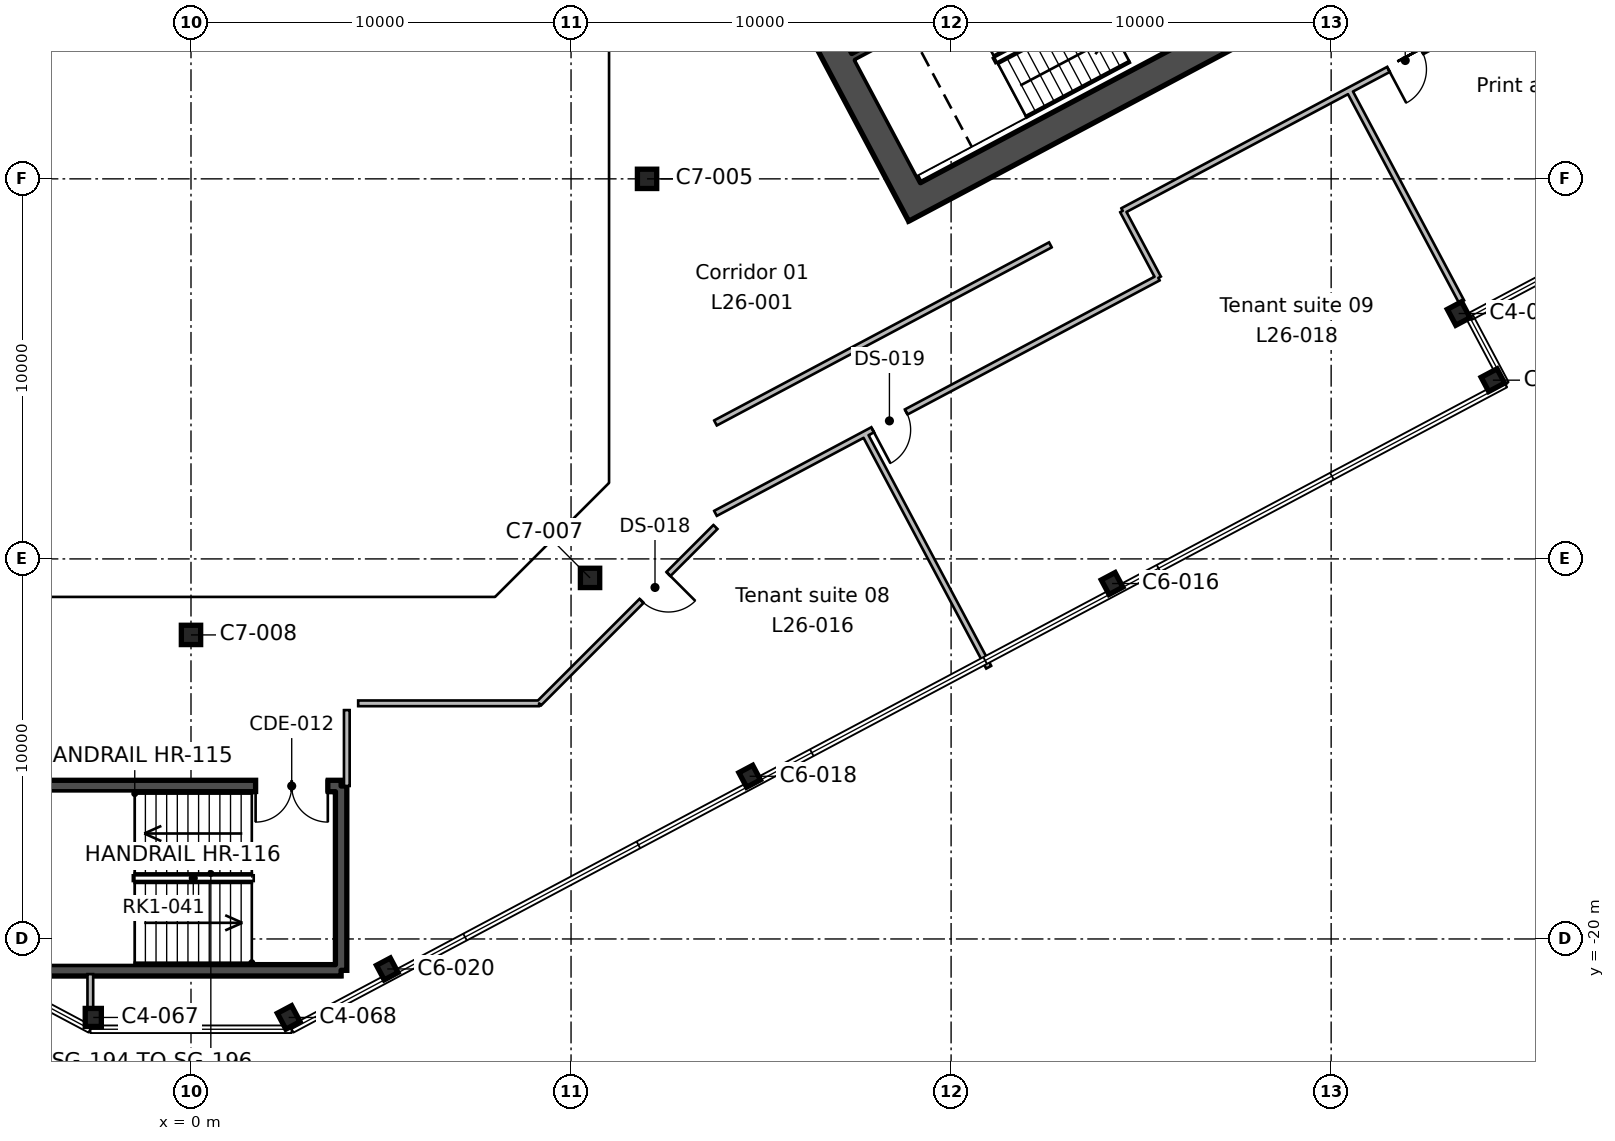
"""IFC4 building model, lengths in metres.
Left out: names, types, materials, properties, quantities, classifications, styles, units other than length and angle.
Written with IfcOpenShell. Run it as: python <this file> out.ifc"""

import sys

from ifc_helpers import new_model, si_unit, direction, frame, frame_2d, origin, origin_2d, place, context, subcontext, project, spatial, rectangle, hollow_rectangle, i_section, extrude, element, fill, save


model = new_model("IFC4")
c1 = context("Model", 3, precision=1e-05, world=origin(), true_north=direction((0.0, 1.0)))
c2 = subcontext(c1, "Body", "Model", "MODEL_VIEW")
j1 = project(units=[si_unit("LENGTHUNIT", "METRE"), si_unit("PLANEANGLEUNIT", "RADIAN")], contexts=[c1])
p1 = place(None, origin())
s1 = spatial("IfcSite", under=j1, at=p1, CompositionType="ELEMENT")
p2 = place(p1, origin())
s2 = spatial("IfcBuilding", under=s1, at=p2, CompositionType="ELEMENT")
p3 = place(p2, frame((0.0, 0.0, 130.2)))
s3 = spatial("IfcBuildingStorey", under=s2, at=p3, CompositionType="ELEMENT", Elevation=130.2)
for number, where, z_axis, x_axis in (
    (1, (-2.571, -22.065, 0.0), (0.0, 0.0, 1.0), (1.0, 0.0, 0.0)),
    (2, (2.571, -22.065, 0.0), (0.0, 0.0, 1.0), (0.883, 0.469, 0.0)),
):
    element("IfcColumn", number, at=place(p3, frame(where, z_axis=z_axis, x_axis=x_axis)), inside=s3, PredefinedType="COLUMN", context=c2, shape_type="SweptSolid", body=[
        extrude(i_section(OverallWidth=0.424, OverallDepth=0.475, WebThickness=0.048, FlangeThickness=0.077, FilletRadius=0.015, at=origin_2d()), origin(), (0.0, 0.0, 1.0), 4.0),
    ])
for number, where, z_axis, x_axis in (
    (3, (5.164, -20.789, 0.0), (0.0, 0.0, 1.0), (0.883, 0.469, 0.0)),
    (4, (14.7, -15.719, 0.0), (0.0, 0.0, 1.0), (0.883, 0.469, 0.0)),
):
    element("IfcColumn", number, at=place(p3, frame(where, z_axis=z_axis, x_axis=x_axis)), inside=s3, PredefinedType="COLUMN", context=c2, shape_type="SweptSolid", body=[
        extrude(i_section(OverallWidth=0.412, OverallDepth=0.434, WebThickness=0.036, FlangeThickness=0.057, FilletRadius=0.015, at=origin_2d()), origin(), (0.0, 0.0, 1.0), 4.0),
    ])
p4 = place(p3, frame((0.0, -12.0, 0.0), z_axis=(0.0, 0.0, 1.0), x_axis=(1.0, 0.0, 0.0)))
e5 = element("IfcColumn", 5, at=p4, inside=s3, PredefinedType="COLUMN", context=c2, shape_type="SweptSolid", body=[
    extrude(hollow_rectangle(XDim=0.508, YDim=0.508, WallThickness=0.012, InnerFilletRadius=0.006, OuterFilletRadius=0.018, at=origin_2d()), origin(), (0.0, 0.0, 1.0), 4.0),
])
p5 = place(p3, frame((24.236, -10.648, 0.0), z_axis=(0.0, 0.0, 1.0), x_axis=(0.882947592859, 0.469471562786, 0.0)))
e6 = element("IfcColumn", 6, at=p5, inside=s3, PredefinedType="COLUMN", context=c2, shape_type="SweptSolid", body=[
    extrude(i_section(OverallWidth=0.412, OverallDepth=0.434, WebThickness=0.036, FlangeThickness=0.057, FilletRadius=0.015, at=origin_2d()), origin(), (0.0, 0.0, 1.0), 4.0),
])
p6 = place(p3, frame((10.5, -10.5, 0.0), z_axis=(0.0, 0.0, 1.0), x_axis=(1.0, 0.0, 0.0)))
e7 = element("IfcColumn", 7, at=p6, inside=s3, PredefinedType="COLUMN", context=c2, shape_type="SweptSolid", body=[
    extrude(hollow_rectangle(XDim=0.508, YDim=0.508, WallThickness=0.012, InnerFilletRadius=0.006, OuterFilletRadius=0.018, at=origin_2d()), origin(), (0.0, 0.0, 1.0), 4.0),
])
for number, where, z_axis, x_axis in (
    (8, (34.256, -5.297, 0.0), (0.0, 0.0, 1.0), (-0.469, 0.883, 0.0)),
    (9, (33.356, -3.543, 0.0), (0.0, 0.0, 1.0), (0.883, 0.469, 0.0)),
):
    element("IfcColumn", number, at=place(p3, frame(where, z_axis=z_axis, x_axis=x_axis)), inside=s3, PredefinedType="COLUMN", context=c2, shape_type="SweptSolid", body=[
        extrude(i_section(OverallWidth=0.424, OverallDepth=0.475, WebThickness=0.048, FlangeThickness=0.077, FilletRadius=0.015, at=origin_2d()), origin(), (0.0, 0.0, 1.0), 4.0),
    ])
p7 = place(p3, frame((12.0, 0.0, 0.0), z_axis=(0.0, 0.0, 1.0), x_axis=(1.0, 0.0, 0.0)))
e10 = element("IfcColumn", 10, at=p7, inside=s3, PredefinedType="COLUMN", context=c2, shape_type="SweptSolid", body=[
    extrude(hollow_rectangle(XDim=0.508, YDim=0.508, WallThickness=0.012, InnerFilletRadius=0.006, OuterFilletRadius=0.018, at=origin_2d()), origin(), (0.0, 0.0, 1.0), 4.0),
])
p8 = place(p3, frame((19.215, -0.939, 0.0), z_axis=(0.0, 0.0, 1.0), x_axis=(-0.469479580143, 0.882943329908, 0.0)))
e11 = element("IfcWall", 11, at=p8, inside=s3, PredefinedType="SHEAR", context=c2, shape_type="SweptSolid", body=[
    extrude(rectangle(XDim=19.7, YDim=0.75, at=frame_2d((9.85, 0.0))), origin(), (0.0, 0.0, 1.0), 4.0),
])
p9 = place(p8, frame((6.85, 0.0, 0.0)))
e12 = element("IfcOpeningElement", 12, at=p9, cuts=e11, PredefinedType="OPENING", context=c2, shape_type="SweptSolid", body=[
    extrude(rectangle(XDim=2.4, YDim=2.4, at=frame_2d((1.2, 1.2))), frame((0.0, 0.385, 0.0), z_axis=(0.0, -1.0, 0.0), x_axis=(1.0, 0.0, 0.0)), (0.0, 0.0, 1.0), 0.77),
])
p10 = place(p3, frame((19.37, -0.432, 0.0), z_axis=(0.0, 0.0, 1.0), x_axis=(0.88294509198, 0.469476266226, 0.0)))
e13 = element("IfcWall", 13, at=p10, inside=s3, PredefinedType="SHEAR", context=c2, shape_type="SweptSolid", body=[
    extrude(rectangle(XDim=20.2, YDim=0.75, at=frame_2d((10.1, 0.0))), origin(), (0.0, 0.0, 1.0), 4.0),
])
p11 = place(p3, frame((17.434, 3.21, 0.0), z_axis=(0.0, 0.0, 1.0), x_axis=(0.882940221191, 0.469485426614, 0.0)))
e14 = element("IfcWall", 14, at=p11, inside=s3, PredefinedType="SHEAR", context=c2, shape_type="SweptSolid", body=[
    extrude(rectangle(XDim=8.0, YDim=0.2, at=frame_2d((4.0, 0.0))), origin(), (0.0, 0.0, 1.0), 4.0),
])
p12 = place(p3, frame((3.95, -15.975, 0.0), z_axis=(0.0, 0.0, 1.0), x_axis=(0.0, -1.0, 0.0)))
e15 = element("IfcWall", 15, at=p12, inside=s3, PredefinedType="SHEAR", context=c2, shape_type="SweptSolid", body=[
    extrude(rectangle(XDim=4.85, YDim=0.3, at=frame_2d((2.425, 0.0))), origin(), (0.0, 0.0, 1.0), 4.0),
])
p13 = place(p3, frame((3.95, -20.825, 0.0), z_axis=(0.0, 0.0, 1.0), x_axis=(-1.0, 0.0, 0.0)))
e16 = element("IfcWall", 16, at=p13, inside=s3, PredefinedType="SHEAR", context=c2, shape_type="SweptSolid", body=[
    extrude(rectangle(XDim=8.3, YDim=0.3, at=frame_2d((4.15, 0.0))), origin(), (0.0, 0.0, 1.0), 4.0),
])
p14 = place(p3, frame((-4.35, -15.975, 0.0), z_axis=(0.0, 0.0, 1.0), x_axis=(1.0, 0.0, 0.0)))
e17 = element("IfcWall", 17, at=p14, inside=s3, PredefinedType="SHEAR", context=c2, shape_type="SweptSolid", body=[
    extrude(rectangle(XDim=8.3, YDim=0.3, at=frame_2d((4.15, 0.0))), origin(), (0.0, 0.0, 1.0), 4.0),
])
p15 = place(p14, frame((6.05, 0.0, 0.0)))
e18 = element("IfcOpeningElement", 18, at=p15, cuts=e17, PredefinedType="OPENING", context=c2, shape_type="SweptSolid", body=[
    extrude(rectangle(XDim=1.9, YDim=2.1, at=frame_2d((0.95, 1.05))), frame((0.0, 0.16, 0.0), z_axis=(0.0, -1.0, 0.0), x_axis=(1.0, 0.0, 0.0)), (0.0, 0.0, 1.0), 0.32),
])
p16 = place(p3, frame((-2.649, -20.925, 0.0), z_axis=(0.0, 0.0, 1.0), x_axis=(0.0, -1.0, 0.0)))
e19 = element("IfcWall", 19, at=p16, inside=s3, PredefinedType="PARTITIONING", context=c2, shape_type="SweptSolid", body=[
    extrude(rectangle(XDim=0.903, YDim=0.15, at=frame_2d((0.451, 0.0))), origin(), (0.0, 0.0, 1.0), 3.64),
])
p17 = place(p3, frame((4.1, -15.975, 0.0), z_axis=(0.0, 0.0, 1.0), x_axis=(0.0, 1.0, 0.0)))
e20 = element("IfcWall", 20, at=p17, inside=s3, PredefinedType="PARTITIONING", context=c2, shape_type="SweptSolid", body=[
    extrude(rectangle(XDim=1.997, YDim=0.15, at=frame_2d((0.999, 0.0))), origin(), (0.0, 0.0, 1.0), 3.64),
])
p18 = place(p3, frame((13.8, -9.16, 0.0), z_axis=(0.0, 0.0, 1.0), x_axis=(-0.707106781187, -0.707106781187, 0.0)))
e21 = element("IfcWall", 21, at=p18, inside=s3, PredefinedType="PARTITIONING", context=c2, shape_type="SweptSolid", body=[
    extrude(rectangle(XDim=6.562, YDim=0.15, at=frame_2d((3.281, 0.0))), origin(), (0.0, 0.0, 1.0), 3.64),
])
p19 = place(p18, frame((1.75, 0.0, 0.0)))
e22 = element("IfcOpeningElement", 22, at=p19, cuts=e21, PredefinedType="OPENING", context=c2, shape_type="SweptSolid", body=[
    extrude(rectangle(XDim=1.0, YDim=2.1, at=frame_2d((0.5, 1.05))), frame((0.0, 0.085, 0.0), z_axis=(0.0, -1.0, 0.0), x_axis=(1.0, 0.0, 0.0)), (0.0, 0.0, 1.0), 0.17),
])
p20 = place(p3, frame((9.16, -13.8, 0.0), z_axis=(0.0, 0.0, 1.0), x_axis=(-1.0, 0.0, 0.0)))
e23 = element("IfcWall", 23, at=p20, inside=s3, PredefinedType="PARTITIONING", context=c2, shape_type="SweptSolid", body=[
    extrude(rectangle(XDim=4.761, YDim=0.15, at=frame_2d((2.38, 0.0))), origin(), (0.0, 0.0, 1.0), 3.64),
])
p21 = place(p3, frame((17.727, -6.713, 0.0), z_axis=(0.0, 0.0, 1.0), x_axis=(0.469441120945, -0.8829637784, 0.0)))
e24 = element("IfcWall", 24, at=p21, inside=s3, PredefinedType="PARTITIONING", context=c2, shape_type="SweptSolid", body=[
    extrude(rectangle(XDim=6.951, YDim=0.15, at=frame_2d((3.475, 0.0))), origin(), (0.0, 0.0, 1.0), 3.64),
])
p22 = place(p3, frame((19.216, -5.922, 0.0), z_axis=(0.0, 0.0, 1.0), x_axis=(-0.882938387259, -0.469488875591, 0.0)))
e25 = element("IfcWall", 25, at=p22, inside=s3, PredefinedType="PARTITIONING", context=c2, shape_type="SweptSolid", body=[
    extrude(rectangle(XDim=6.134, YDim=0.15, at=frame_2d((3.067, 0.0))), origin(), (0.0, 0.0, 1.0), 3.64),
])
p23 = place(p22, frame((0.45, 0.0, 0.0)))
e26 = element("IfcOpeningElement", 26, at=p23, cuts=e25, PredefinedType="OPENING", context=c2, shape_type="SweptSolid", body=[
    extrude(rectangle(XDim=1.0, YDim=2.1, at=frame_2d((0.5, 1.05))), frame((0.0, 0.085, 0.0), z_axis=(0.0, -1.0, 0.0), x_axis=(1.0, 0.0, 0.0)), (0.0, 0.0, 1.0), 0.17),
])
p24 = place(p3, frame((24.515, -0.842, 0.0), z_axis=(0.0, 0.0, 1.0), x_axis=(0.469509609091, -0.882927362228, 0.0)))
e27 = element("IfcWall", 27, at=p24, inside=s3, PredefinedType="PARTITIONING", context=c2, shape_type="SweptSolid", body=[
    extrude(rectangle(XDim=1.998, YDim=0.15, at=frame_2d((0.999, 0.0))), origin(), (0.0, 0.0, 1.0), 3.64),
])
p25 = place(p3, frame((25.453, -2.606, 0.0), z_axis=(0.0, 0.0, 1.0), x_axis=(-0.882948296906, -0.469470238663, 0.0)))
e28 = element("IfcWall", 28, at=p25, inside=s3, PredefinedType="PARTITIONING", context=c2, shape_type="SweptSolid", body=[
    extrude(rectangle(XDim=7.064, YDim=0.15, at=frame_2d((3.532, 0.0))), origin(), (0.0, 0.0, 1.0), 3.64),
])
p26 = place(p3, frame((30.474, 2.329, 0.0), z_axis=(0.0, 0.0, 1.0), x_axis=(0.469455518244, -0.882956123706, 0.0)))
e29 = element("IfcWall", 29, at=p26, inside=s3, PredefinedType="PARTITIONING", context=c2, shape_type="SweptSolid", body=[
    extrude(rectangle(XDim=6.3, YDim=0.15, at=frame_2d((3.15, 0.0))), origin(), (0.0, 0.0, 1.0), 3.64),
])
p27 = place(p3, frame((39.321, 7.034, 0.0), z_axis=(0.0, 0.0, 1.0), x_axis=(-0.88292452231, -0.469514949605, 0.0)))
e30 = element("IfcWall", 30, at=p27, inside=s3, PredefinedType="PARTITIONING", context=c2, shape_type="SweptSolid", body=[
    extrude(rectangle(XDim=16.771, YDim=0.15, at=frame_2d((8.385, 0.0))), origin(), (0.0, 0.0, 1.0), 3.64),
])
p28 = place(p27, frame((7.849, 0.0, 0.0)))
e31 = element("IfcOpeningElement", 31, at=p28, cuts=e30, PredefinedType="OPENING", context=c2, shape_type="SweptSolid", body=[
    extrude(rectangle(XDim=1.0, YDim=2.1, at=frame_2d((0.5, 1.05))), frame((0.0, 0.085, 0.0), z_axis=(0.0, -1.0, 0.0), x_axis=(1.0, 0.0, 0.0)), (0.0, 0.0, 1.0), 0.17),
])
p29 = place(p3, frame((13.8, -6.423, 0.0), z_axis=(0.0, 0.0, 1.0), x_axis=(0.882944014424, 0.469478292782, 0.0)))
e32 = element("IfcWall", 32, at=p29, inside=s3, PredefinedType="PARTITIONING", context=c2, shape_type="SweptSolid", body=[
    extrude(rectangle(XDim=9.981, YDim=0.15, at=frame_2d((4.991, 0.0))), origin(), (0.0, 0.0, 1.0), 3.64),
])
p30 = place(p15, frame((1.9, 0.0, 0.0), z_axis=(0.0, 0.0, 1.0), x_axis=(-1.0, 0.0, 0.0)))
e33 = element("IfcDoor", 33, at=p30, inside=s3, OperationType="DOUBLE_DOOR_SINGLE_SWING", PredefinedType="DOOR", context=c2, shape_type="SweptSolid", body=[
    extrude(rectangle(XDim=1.9, YDim=2.1, at=frame_2d((0.95, 1.05))), frame((0.0, 0.025, 0.0), z_axis=(0.0, -1.0, 0.0), x_axis=(1.0, 0.0, 0.0)), (0.0, 0.0, 1.0), 0.05),
])
fill(e18, e33)
p31 = place(p19, origin())
e34 = element("IfcDoor", 34, at=p31, inside=s3, OperationType="SINGLE_SWING_LEFT", PredefinedType="DOOR", context=c2, shape_type="SweptSolid", body=[
    extrude(rectangle(XDim=1.0, YDim=2.1, at=frame_2d((0.5, 1.05))), frame((0.0, 0.025, 0.0), z_axis=(0.0, -1.0, 0.0), x_axis=(1.0, 0.0, 0.0)), (0.0, 0.0, 1.0), 0.05),
])
fill(e22, e34)
p32 = place(p23, origin())
e35 = element("IfcDoor", 35, at=p32, inside=s3, OperationType="SINGLE_SWING_RIGHT", PredefinedType="DOOR", context=c2, shape_type="SweptSolid", body=[
    extrude(rectangle(XDim=1.0, YDim=2.1, at=frame_2d((0.5, 1.05))), frame((0.0, 0.025, 0.0), z_axis=(0.0, -1.0, 0.0), x_axis=(1.0, 0.0, 0.0)), (0.0, 0.0, 1.0), 0.05),
])
fill(e26, e35)
p33 = place(p28, origin())
e36 = element("IfcDoor", 36, at=p33, inside=s3, OperationType="SINGLE_SWING_RIGHT", PredefinedType="DOOR", context=c2, shape_type="SweptSolid", body=[
    extrude(rectangle(XDim=1.0, YDim=2.1, at=frame_2d((0.5, 1.05))), frame((0.0, 0.025, 0.0), z_axis=(0.0, -1.0, 0.0), x_axis=(1.0, 0.0, 0.0)), (0.0, 0.0, 1.0), 0.05),
])
fill(e31, e36)
save(model, sys.argv[1])
